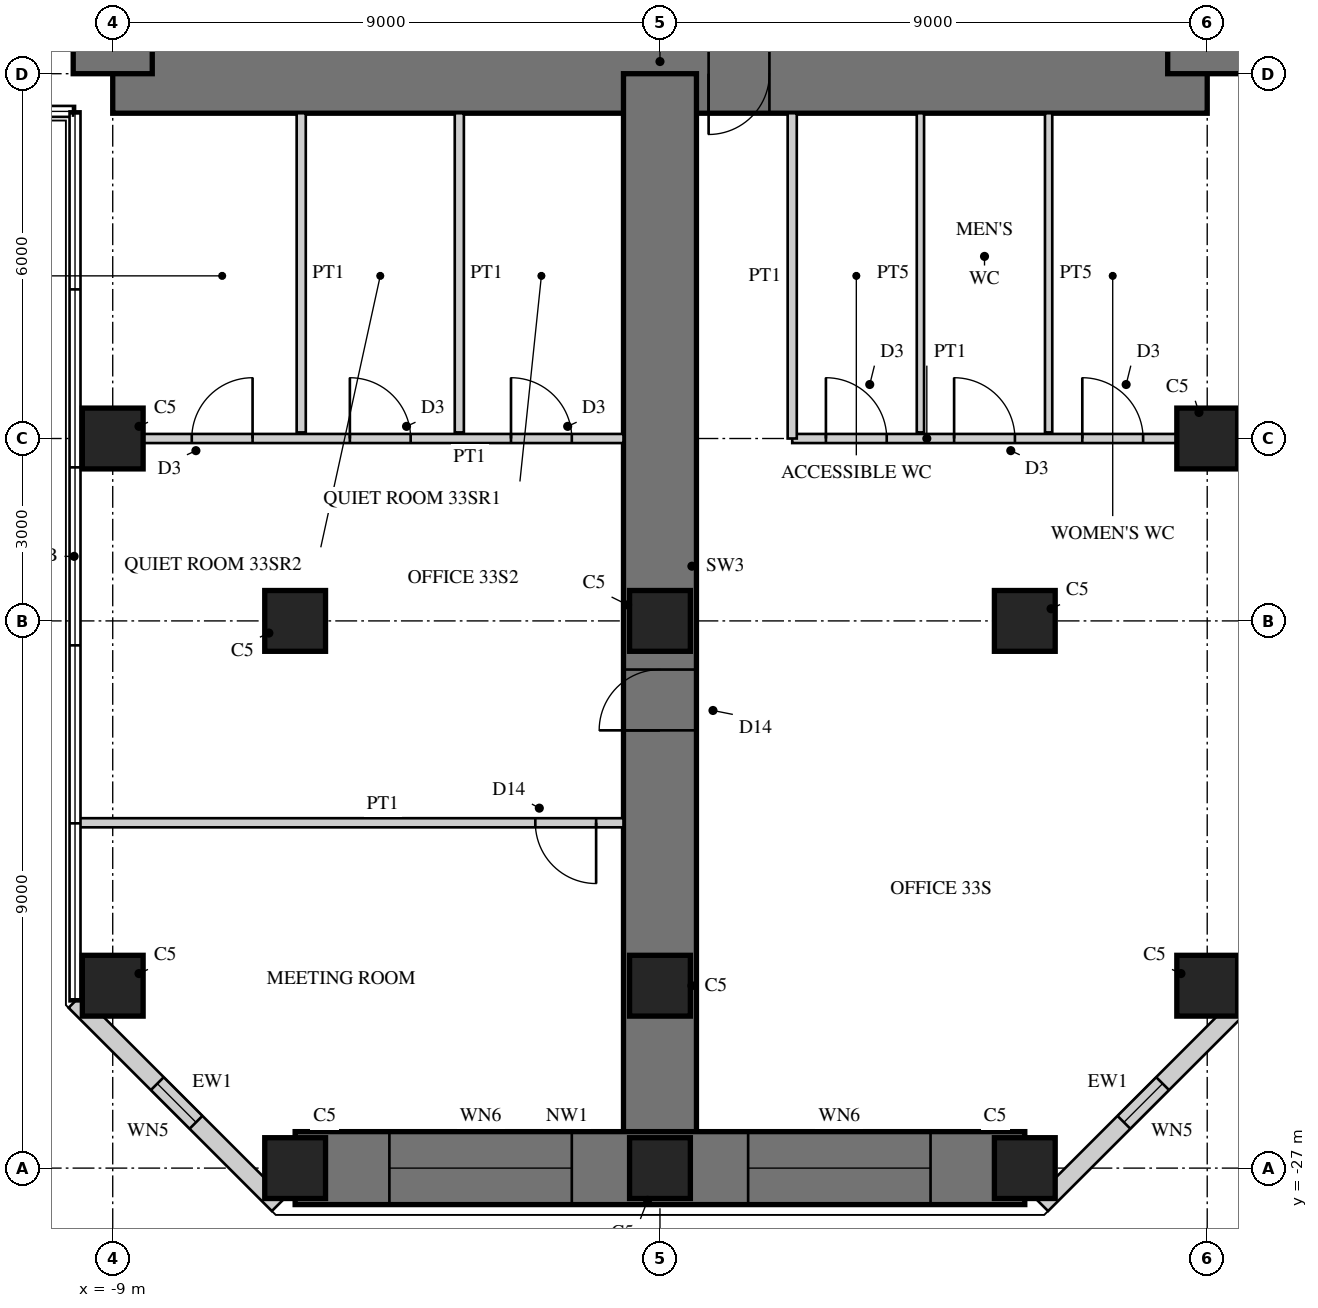
"""IFC4 building model, lengths in metres.
Left out: names, types, materials, properties, quantities, classifications, styles, units other than length and angle.
Written with IfcOpenShell. Run it as: python <this file> out.ifc"""

import sys

from ifc_helpers import new_model, si_unit, direction, frame, frame_2d, origin, origin_2d, place, context, subcontext, project, spatial, rectangle, hollow_rectangle, extrude, element, fill, save


model = new_model("IFC4")
c1 = context("Model", 3, precision=1e-05, world=origin(), true_north=direction((0.0, 1.0)))
c2 = subcontext(c1, "Body", "Model", "MODEL_VIEW")
j1 = project(units=[si_unit("LENGTHUNIT", "METRE"), si_unit("PLANEANGLEUNIT", "RADIAN")], contexts=[c1])
p1 = place(None, origin())
s1 = spatial("IfcSite", under=j1, at=p1, CompositionType="ELEMENT")
p2 = place(p1, origin())
s2 = spatial("IfcBuilding", under=s1, at=p2, CompositionType="ELEMENT")
p3 = place(p2, frame((0.0, 0.0, 136.5)))
s3 = spatial("IfcBuildingStorey", under=s2, at=p3, CompositionType="ELEMENT", Elevation=136.5)
p4 = place(p3, frame((-9.0, -9.0, 0.0), z_axis=(0.0, 0.0, 1.0), x_axis=(1.0, 0.0, 0.0)))
e1 = element("IfcWall", 1, at=p4, inside=s3, PredefinedType="SHEAR", context=c2, shape_type="SweptSolid", body=[
    extrude(rectangle(XDim=18.0, YDim=1.3, at=frame_2d((9.0, 0.0))), origin(), (0.0, 0.0, 1.0), 4.0),
])
p5 = place(p4, frame((9.8, 0.0, 0.0)))
e2 = element("IfcOpeningElement", 2, at=p5, cuts=e1, PredefinedType="OPENING", context=c2, shape_type="SweptSolid", body=[
    extrude(rectangle(XDim=1.0, YDim=2.4, at=frame_2d((0.5, 1.2))), frame((0.0, 0.66, 0.0), z_axis=(0.0, -1.0, 0.0), x_axis=(1.0, 0.0, 0.0)), (0.0, 0.0, 1.0), 1.32),
])
p6 = place(p3, frame((9.0, -9.0, 0.0), z_axis=(0.0, 0.0, 1.0), x_axis=(0.0, 1.0, 0.0)))
e3 = element("IfcWall", 3, at=p6, inside=s3, PredefinedType="SHEAR", context=c2, shape_type="SweptSolid", body=[
    extrude(rectangle(XDim=18.0, YDim=1.3, at=frame_2d((9.0, 0.0))), origin(), (0.0, 0.0, 1.0), 4.0),
])
p7 = place(p6, frame((9.8, 0.0, 0.0)))
e4 = element("IfcOpeningElement", 4, at=p7, cuts=e3, PredefinedType="OPENING", context=c2, shape_type="SweptSolid", body=[
    extrude(rectangle(XDim=1.0, YDim=2.4, at=frame_2d((0.5, 1.2))), frame((0.0, 0.66, 0.0), z_axis=(0.0, -1.0, 0.0), x_axis=(1.0, 0.0, 0.0)), (0.0, 0.0, 1.0), 1.32),
])
p8 = place(p3, frame((-9.0, 9.0, 0.0), z_axis=(0.0, 0.0, 1.0), x_axis=(0.0, -1.0, 0.0)))
e5 = element("IfcWall", 5, at=p8, inside=s3, PredefinedType="SHEAR", context=c2, shape_type="SweptSolid", body=[
    extrude(rectangle(XDim=18.0, YDim=1.3, at=frame_2d((9.0, 0.0))), origin(), (0.0, 0.0, 1.0), 4.0),
])
p9 = place(p8, frame((9.8, 0.0, 0.0)))
e6 = element("IfcOpeningElement", 6, at=p9, cuts=e5, PredefinedType="OPENING", context=c2, shape_type="SweptSolid", body=[
    extrude(rectangle(XDim=1.0, YDim=2.4, at=frame_2d((0.5, 1.2))), frame((0.0, 0.66, 0.0), z_axis=(0.0, -1.0, 0.0), x_axis=(1.0, 0.0, 0.0)), (0.0, 0.0, 1.0), 1.32),
])
p10 = place(p3, frame((0.0, -9.0, 0.0), z_axis=(0.0, 0.0, 1.0), x_axis=(0.0, -1.0, 0.0)))
e7 = element("IfcWall", 7, at=p10, inside=s3, PredefinedType="SHEAR", context=c2, shape_type="SweptSolid", body=[
    extrude(rectangle(XDim=18.0, YDim=1.2, at=frame_2d((9.0, 0.0))), origin(), (0.0, 0.0, 1.0), 4.0),
])
p11 = place(p10, frame((9.8, 0.0, 0.0)))
e8 = element("IfcOpeningElement", 8, at=p11, cuts=e7, PredefinedType="OPENING", context=c2, shape_type="SweptSolid", body=[
    extrude(rectangle(XDim=1.0, YDim=2.2, at=frame_2d((0.5, 1.1))), frame((0.0, 0.61, 0.0), z_axis=(0.0, -1.0, 0.0), x_axis=(1.0, 0.0, 0.0)), (0.0, 0.0, 1.0), 1.22),
])
p12 = place(p3, frame((-6.0, -27.0, 0.0), z_axis=(0.0, 0.0, 1.0), x_axis=(1.0, 0.0, 0.0)))
e9 = element("IfcWall", 9, at=p12, inside=s3, PredefinedType="SHEAR", context=c2, shape_type="SweptSolid", body=[
    extrude(rectangle(XDim=12.0, YDim=1.2, at=frame_2d((6.0, 0.0))), origin(), (0.0, 0.0, 1.0), 4.0),
])
p13 = place(p12, frame((1.55, 0.0, 0.6)))
e10 = element("IfcOpeningElement", 10, at=p13, cuts=e9, PredefinedType="OPENING", context=c2, shape_type="SweptSolid", body=[
    extrude(rectangle(XDim=3.0, YDim=2.4, at=frame_2d((1.5, 1.2))), frame((0.0, 0.61, 0.0), z_axis=(0.0, -1.0, 0.0), x_axis=(1.0, 0.0, 0.0)), (0.0, 0.0, 1.0), 1.22),
])
p14 = place(p12, frame((7.45, 0.0, 0.6)))
e11 = element("IfcOpeningElement", 11, at=p14, cuts=e9, PredefinedType="OPENING", context=c2, shape_type="SweptSolid", body=[
    extrude(rectangle(XDim=3.0, YDim=2.4, at=frame_2d((1.5, 1.2))), frame((0.0, 0.61, 0.0), z_axis=(0.0, -1.0, 0.0), x_axis=(1.0, 0.0, 0.0)), (0.0, 0.0, 1.0), 1.22),
])
for number, where, z_axis, x_axis in (
    (12, (-9.0, -15.0, 0.0), (0.0, 0.0, 1.0), (1.0, 0.0, 0.0)),
    (13, (-9.0, -24.0, 0.0), (0.0, 0.0, 1.0), (1.0, 0.0, 0.0)),
    (14, (9.0, -15.0, 0.0), (0.0, 0.0, 1.0), (1.0, 0.0, 0.0)),
    (15, (9.0, -24.0, 0.0), (0.0, 0.0, 1.0), (1.0, 0.0, 0.0)),
    (16, (-6.0, -27.0, 0.0), (0.0, 0.0, 1.0), (1.0, 0.0, 0.0)),
    (17, (0.0, -27.0, 0.0), (0.0, 0.0, 1.0), (1.0, 0.0, 0.0)),
    (18, (6.0, -27.0, 0.0), (0.0, 0.0, 1.0), (1.0, 0.0, 0.0)),
    (19, (-6.0, -18.0, 0.0), (0.0, 0.0, 1.0), (1.0, 0.0, 0.0)),
    (20, (0.0, -18.0, 0.0), (0.0, 0.0, 1.0), (1.0, 0.0, 0.0)),
    (21, (6.0, -18.0, 0.0), (0.0, 0.0, 1.0), (1.0, 0.0, 0.0)),
    (22, (0.0, -24.0, 0.0), (0.0, 0.0, 1.0), (1.0, 0.0, 0.0)),
):
    element("IfcColumn", number, at=place(p3, frame(where, z_axis=z_axis, x_axis=x_axis)), inside=s3, PredefinedType="COLUMN", context=c2, shape_type="SweptSolid", body=[
        extrude(rectangle(XDim=1.0, YDim=1.0, at=origin_2d()), origin(), (0.0, 0.0, 1.0), 4.0),
    ])
p15 = place(p3, frame((-9.62, -24.257, 0.0), z_axis=(0.0, 0.0, 1.0), x_axis=(0.707106781187, -0.707106781187, 0.0)))
e23 = element("IfcWall", 23, at=p15, inside=s3, PredefinedType="SOLIDWALL", context=c2, shape_type="SweptSolid", body=[
    extrude(rectangle(XDim=4.728, YDim=0.3, at=frame_2d((2.364, 0.0))), origin(), (0.0, 0.0, 1.0), 3.8),
])
p16 = place(p15, frame((1.914, 0.0, 0.3)))
e24 = element("IfcOpeningElement", 24, at=p16, cuts=e23, PredefinedType="OPENING", context=c2, shape_type="SweptSolid", body=[
    extrude(rectangle(XDim=0.9, YDim=2.4, at=frame_2d((0.45, 1.2))), frame((0.0, 0.16, 0.0), z_axis=(0.0, -1.0, 0.0), x_axis=(1.0, 0.0, 0.0)), (0.0, 0.0, 1.0), 0.32),
])
p17 = place(p3, frame((6.277, -27.6, 0.0), z_axis=(0.0, 0.0, 1.0), x_axis=(0.707106781187, 0.707106781187, 0.0)))
e25 = element("IfcWall", 25, at=p17, inside=s3, PredefinedType="SOLIDWALL", context=c2, shape_type="SweptSolid", body=[
    extrude(rectangle(XDim=4.728, YDim=0.3, at=frame_2d((2.364, 0.0))), origin(), (0.0, 0.0, 1.0), 3.8),
])
p18 = place(p17, frame((1.914, 0.0, 0.3)))
e26 = element("IfcOpeningElement", 26, at=p18, cuts=e25, PredefinedType="OPENING", context=c2, shape_type="SweptSolid", body=[
    extrude(rectangle(XDim=0.9, YDim=2.4, at=frame_2d((0.45, 1.2))), frame((0.0, 0.16, 0.0), z_axis=(0.0, -1.0, 0.0), x_axis=(1.0, 0.0, 0.0)), (0.0, 0.0, 1.0), 0.32),
])
p19 = place(p3, frame((2.175, -15.0, 0.0), z_axis=(0.0, 0.0, 1.0), x_axis=(1.0, 0.0, 0.0)))
e27 = element("IfcWall", 27, at=p19, inside=s3, PredefinedType="PARTITIONING", context=c2, shape_type="SweptSolid", body=[
    extrude(rectangle(XDim=6.325, YDim=0.15, at=frame_2d((3.163, 0.0))), origin(), (0.0, 0.0, 1.0), 3.0),
])
p20 = place(p19, frame((0.554, 0.0, 0.0)))
e28 = element("IfcOpeningElement", 28, at=p20, cuts=e27, PredefinedType="OPENING", context=c2, shape_type="SweptSolid", body=[
    extrude(rectangle(XDim=1.0, YDim=2.1, at=frame_2d((0.5, 1.05))), frame((0.0, 0.085, 0.0), z_axis=(0.0, -1.0, 0.0), x_axis=(1.0, 0.0, 0.0)), (0.0, 0.0, 1.0), 0.17),
])
p21 = place(p19, frame((2.663, 0.0, 0.0)))
e29 = element("IfcOpeningElement", 29, at=p21, cuts=e27, PredefinedType="OPENING", context=c2, shape_type="SweptSolid", body=[
    extrude(rectangle(XDim=1.0, YDim=2.1, at=frame_2d((0.5, 1.05))), frame((0.0, 0.085, 0.0), z_axis=(0.0, -1.0, 0.0), x_axis=(1.0, 0.0, 0.0)), (0.0, 0.0, 1.0), 0.17),
])
p22 = place(p19, frame((4.771, 0.0, 0.0)))
e30 = element("IfcOpeningElement", 30, at=p22, cuts=e27, PredefinedType="OPENING", context=c2, shape_type="SweptSolid", body=[
    extrude(rectangle(XDim=1.0, YDim=2.1, at=frame_2d((0.5, 1.05))), frame((0.0, 0.085, 0.0), z_axis=(0.0, -1.0, 0.0), x_axis=(1.0, 0.0, 0.0)), (0.0, 0.0, 1.0), 0.17),
])
p23 = place(p3, frame((2.175, -9.65, 0.0), z_axis=(0.0, 0.0, 1.0), x_axis=(0.0, -1.0, 0.0)))
e31 = element("IfcWall", 31, at=p23, inside=s3, PredefinedType="PARTITIONING", context=c2, shape_type="SweptSolid", body=[
    extrude(rectangle(XDim=5.35, YDim=0.15, at=frame_2d((2.675, 0.0))), origin(), (0.0, 0.0, 1.0), 3.8),
])
for number, where, z_axis, x_axis in (
    (32, (4.283, -9.65, 0.0), (0.0, 0.0, 1.0), (0.0, -1.0, 0.0)),
    (33, (6.392, -9.65, 0.0), (0.0, 0.0, 1.0), (0.0, -1.0, 0.0)),
):
    element("IfcWall", number, at=place(p3, frame(where, z_axis=z_axis, x_axis=x_axis)), inside=s3, PredefinedType="PLUMBINGWALL", context=c2, shape_type="SweptSolid", body=[
        extrude(rectangle(XDim=5.25, YDim=0.12, at=frame_2d((2.625, 0.0))), origin(), (0.0, 0.0, 1.0), 3.8),
    ])
p24 = place(p3, frame((-8.5, -15.0, 0.0), z_axis=(0.0, 0.0, 1.0), x_axis=(1.0, 0.0, 0.0)))
e34 = element("IfcWall", 34, at=p24, inside=s3, PredefinedType="PARTITIONING", context=c2, shape_type="SweptSolid", body=[
    extrude(rectangle(XDim=7.9, YDim=0.15, at=frame_2d((3.95, 0.0))), origin(), (0.0, 0.0, 1.0), 3.0),
])
p25 = place(p24, frame((0.8, 0.0, 0.0)))
e35 = element("IfcOpeningElement", 35, at=p25, cuts=e34, PredefinedType="OPENING", context=c2, shape_type="SweptSolid", body=[
    extrude(rectangle(XDim=1.0, YDim=2.1, at=frame_2d((0.5, 1.05))), frame((0.0, 0.085, 0.0), z_axis=(0.0, -1.0, 0.0), x_axis=(1.0, 0.0, 0.0)), (0.0, 0.0, 1.0), 0.17),
])
p26 = place(p24, frame((3.4, 0.0, 0.0)))
e36 = element("IfcOpeningElement", 36, at=p26, cuts=e34, PredefinedType="OPENING", context=c2, shape_type="SweptSolid", body=[
    extrude(rectangle(XDim=1.0, YDim=2.1, at=frame_2d((0.5, 1.05))), frame((0.0, 0.085, 0.0), z_axis=(0.0, -1.0, 0.0), x_axis=(1.0, 0.0, 0.0)), (0.0, 0.0, 1.0), 0.17),
])
p27 = place(p24, frame((6.05, 0.0, 0.0)))
e37 = element("IfcOpeningElement", 37, at=p27, cuts=e34, PredefinedType="OPENING", context=c2, shape_type="SweptSolid", body=[
    extrude(rectangle(XDim=1.0, YDim=2.1, at=frame_2d((0.5, 1.05))), frame((0.0, 0.085, 0.0), z_axis=(0.0, -1.0, 0.0), x_axis=(1.0, 0.0, 0.0)), (0.0, 0.0, 1.0), 0.17),
])
p28 = place(p3, frame((-3.3, -9.65, 0.0), z_axis=(0.0, 0.0, 1.0), x_axis=(0.0, -1.0, 0.0)))
e38 = element("IfcWall", 38, at=p28, inside=s3, PredefinedType="PARTITIONING", context=c2, shape_type="SweptSolid", body=[
    extrude(rectangle(XDim=5.25, YDim=0.15, at=frame_2d((2.625, 0.0))), origin(), (0.0, 0.0, 1.0), 3.8),
])
p29 = place(p3, frame((-5.9, -9.65, 0.0), z_axis=(0.0, 0.0, 1.0), x_axis=(0.0, -1.0, 0.0)))
e39 = element("IfcWall", 39, at=p29, inside=s3, PredefinedType="PARTITIONING", context=c2, shape_type="SweptSolid", body=[
    extrude(rectangle(XDim=5.25, YDim=0.15, at=frame_2d((2.625, 0.0))), origin(), (0.0, 0.0, 1.0), 3.1),
])
p30 = place(p3, frame((-9.58, -21.32, 0.0), z_axis=(0.0, 0.0, 1.0), x_axis=(1.0, 0.0, 0.0)))
e40 = element("IfcWall", 40, at=p30, inside=s3, PredefinedType="PARTITIONING", context=c2, shape_type="SweptSolid", body=[
    extrude(rectangle(XDim=8.98, YDim=0.15, at=frame_2d((4.49, 0.0))), origin(), (0.0, 0.0, 1.0), 3.8),
])
p31 = place(p30, frame((7.53, 0.0, 0.0)))
e41 = element("IfcOpeningElement", 41, at=p31, cuts=e40, PredefinedType="OPENING", context=c2, shape_type="SweptSolid", body=[
    extrude(rectangle(XDim=1.0, YDim=2.2, at=frame_2d((0.5, 1.1))), frame((0.0, 0.085, 0.0), z_axis=(0.0, -1.0, 0.0), x_axis=(1.0, 0.0, 0.0)), (0.0, 0.0, 1.0), 0.17),
])
p32 = place(p16, origin())
e42 = element("IfcWindow", 42, at=p32, inside=s3, PartitioningType="SINGLE_PANEL", PredefinedType="WINDOW", context=c2, shape_type="SweptSolid", body=[
    extrude(hollow_rectangle(XDim=0.9, YDim=2.4, WallThickness=0.06, at=frame_2d((0.45, 1.2))), frame((0.0, 0.03, 0.0), z_axis=(0.0, -1.0, 0.0), x_axis=(1.0, 0.0, 0.0)), (0.0, 0.0, 1.0), 0.06),
    extrude(rectangle(XDim=0.779, YDim=2.279, at=frame_2d((0.45, 1.2))), frame((0.0, 0.03, 0.0), z_axis=(0.0, -1.0, 0.0), x_axis=(1.0, 0.0, 0.0)), (0.0, 0.0, 1.0), 0.06),
])
fill(e24, e42)
p33 = place(p13, origin())
e43 = element("IfcWindow", 43, at=p33, inside=s3, PartitioningType="SINGLE_PANEL", PredefinedType="WINDOW", context=c2, shape_type="SweptSolid", body=[
    extrude(hollow_rectangle(XDim=3.0, YDim=2.4, WallThickness=0.06, at=frame_2d((1.5, 1.2))), frame((0.0, 0.03, 0.0), z_axis=(0.0, -1.0, 0.0), x_axis=(1.0, 0.0, 0.0)), (0.0, 0.0, 1.0), 0.06),
    extrude(rectangle(XDim=2.879, YDim=2.279, at=frame_2d((1.5, 1.2))), frame((0.0, 0.03, 0.0), z_axis=(0.0, -1.0, 0.0), x_axis=(1.0, 0.0, 0.0)), (0.0, 0.0, 1.0), 0.06),
])
fill(e10, e43)
p34 = place(p14, origin())
e44 = element("IfcWindow", 44, at=p34, inside=s3, PartitioningType="SINGLE_PANEL", PredefinedType="WINDOW", context=c2, shape_type="SweptSolid", body=[
    extrude(hollow_rectangle(XDim=3.0, YDim=2.4, WallThickness=0.06, at=frame_2d((1.5, 1.2))), frame((0.0, 0.03, 0.0), z_axis=(0.0, -1.0, 0.0), x_axis=(1.0, 0.0, 0.0)), (0.0, 0.0, 1.0), 0.06),
    extrude(rectangle(XDim=2.879, YDim=2.279, at=frame_2d((1.5, 1.2))), frame((0.0, 0.03, 0.0), z_axis=(0.0, -1.0, 0.0), x_axis=(1.0, 0.0, 0.0)), (0.0, 0.0, 1.0), 0.06),
])
fill(e11, e44)
p35 = place(p18, origin())
e45 = element("IfcWindow", 45, at=p35, inside=s3, PartitioningType="SINGLE_PANEL", PredefinedType="WINDOW", context=c2, shape_type="SweptSolid", body=[
    extrude(hollow_rectangle(XDim=0.9, YDim=2.4, WallThickness=0.06, at=frame_2d((0.45, 1.2))), frame((0.0, 0.03, 0.0), z_axis=(0.0, -1.0, 0.0), x_axis=(1.0, 0.0, 0.0)), (0.0, 0.0, 1.0), 0.06),
    extrude(rectangle(XDim=0.779, YDim=2.279, at=frame_2d((0.45, 1.2))), frame((0.0, 0.03, 0.0), z_axis=(0.0, -1.0, 0.0), x_axis=(1.0, 0.0, 0.0)), (0.0, 0.0, 1.0), 0.06),
])
fill(e26, e45)
p36 = place(p20, origin())
e46 = element("IfcDoor", 46, at=p36, inside=s3, OperationType="SINGLE_SWING_LEFT", PredefinedType="DOOR", context=c2, shape_type="SweptSolid", body=[
    extrude(rectangle(XDim=1.0, YDim=2.1, at=frame_2d((0.5, 1.05))), frame((0.0, 0.025, 0.0), z_axis=(0.0, -1.0, 0.0), x_axis=(1.0, 0.0, 0.0)), (0.0, 0.0, 1.0), 0.05),
])
fill(e28, e46)
p37 = place(p21, origin())
e47 = element("IfcDoor", 47, at=p37, inside=s3, OperationType="SINGLE_SWING_LEFT", PredefinedType="DOOR", context=c2, shape_type="SweptSolid", body=[
    extrude(rectangle(XDim=1.0, YDim=2.1, at=frame_2d((0.5, 1.05))), frame((0.0, 0.025, 0.0), z_axis=(0.0, -1.0, 0.0), x_axis=(1.0, 0.0, 0.0)), (0.0, 0.0, 1.0), 0.05),
])
fill(e29, e47)
p38 = place(p22, origin())
e48 = element("IfcDoor", 48, at=p38, inside=s3, OperationType="SINGLE_SWING_LEFT", PredefinedType="DOOR", context=c2, shape_type="SweptSolid", body=[
    extrude(rectangle(XDim=1.0, YDim=2.1, at=frame_2d((0.5, 1.05))), frame((0.0, 0.025, 0.0), z_axis=(0.0, -1.0, 0.0), x_axis=(1.0, 0.0, 0.0)), (0.0, 0.0, 1.0), 0.05),
])
fill(e30, e48)
p39 = place(p25, origin())
e49 = element("IfcDoor", 49, at=p39, inside=s3, OperationType="SINGLE_SWING_RIGHT", PredefinedType="DOOR", context=c2, shape_type="SweptSolid", body=[
    extrude(rectangle(XDim=1.0, YDim=2.1, at=frame_2d((0.5, 1.05))), frame((0.0, 0.025, 0.0), z_axis=(0.0, -1.0, 0.0), x_axis=(1.0, 0.0, 0.0)), (0.0, 0.0, 1.0), 0.05),
])
fill(e35, e49)
p40 = place(p26, origin())
e50 = element("IfcDoor", 50, at=p40, inside=s3, OperationType="SINGLE_SWING_LEFT", PredefinedType="DOOR", context=c2, shape_type="SweptSolid", body=[
    extrude(rectangle(XDim=1.0, YDim=2.1, at=frame_2d((0.5, 1.05))), frame((0.0, 0.025, 0.0), z_axis=(0.0, -1.0, 0.0), x_axis=(1.0, 0.0, 0.0)), (0.0, 0.0, 1.0), 0.05),
])
fill(e36, e50)
p41 = place(p27, origin())
e51 = element("IfcDoor", 51, at=p41, inside=s3, OperationType="SINGLE_SWING_LEFT", PredefinedType="DOOR", context=c2, shape_type="SweptSolid", body=[
    extrude(rectangle(XDim=1.0, YDim=2.1, at=frame_2d((0.5, 1.05))), frame((0.0, 0.025, 0.0), z_axis=(0.0, -1.0, 0.0), x_axis=(1.0, 0.0, 0.0)), (0.0, 0.0, 1.0), 0.05),
])
fill(e37, e51)
p42 = place(p31, frame((1.0, 0.0, 0.0), z_axis=(0.0, 0.0, 1.0), x_axis=(-1.0, 0.0, 0.0)))
e52 = element("IfcDoor", 52, at=p42, inside=s3, OperationType="SINGLE_SWING_LEFT", PredefinedType="DOOR", context=c2, shape_type="SweptSolid", body=[
    extrude(rectangle(XDim=1.0, YDim=2.2, at=frame_2d((0.5, 1.1))), frame((0.0, 0.025, 0.0), z_axis=(0.0, -1.0, 0.0), x_axis=(1.0, 0.0, 0.0)), (0.0, 0.0, 1.0), 0.05),
])
fill(e41, e52)
p43 = place(p11, frame((1.0, 0.0, 0.0), z_axis=(0.0, 0.0, 1.0), x_axis=(-1.0, 0.0, 0.0)))
e53 = element("IfcDoor", 53, at=p43, inside=s3, OperationType="SINGLE_SWING_LEFT", PredefinedType="DOOR", context=c2, shape_type="SweptSolid", body=[
    extrude(rectangle(XDim=1.0, YDim=2.2, at=frame_2d((0.5, 1.1))), frame((0.0, 0.025, 0.0), z_axis=(0.0, -1.0, 0.0), x_axis=(1.0, 0.0, 0.0)), (0.0, 0.0, 1.0), 0.05),
])
fill(e8, e53)
p44 = place(p5, frame((1.0, 0.0, 0.0), z_axis=(0.0, 0.0, 1.0), x_axis=(-1.0, 0.0, 0.0)))
e54 = element("IfcDoor", 54, at=p44, inside=s3, OperationType="SINGLE_SWING_RIGHT", PredefinedType="DOOR", context=c2, shape_type="SweptSolid", body=[
    extrude(rectangle(XDim=1.0, YDim=2.4, at=frame_2d((0.5, 1.2))), frame((0.0, -0.005, 0.0), z_axis=(0.0, -1.0, 0.0), x_axis=(1.0, 0.0, 0.0)), (0.0, 0.0, 1.0), 0.05),
])
fill(e2, e54)
save(model, sys.argv[1])
